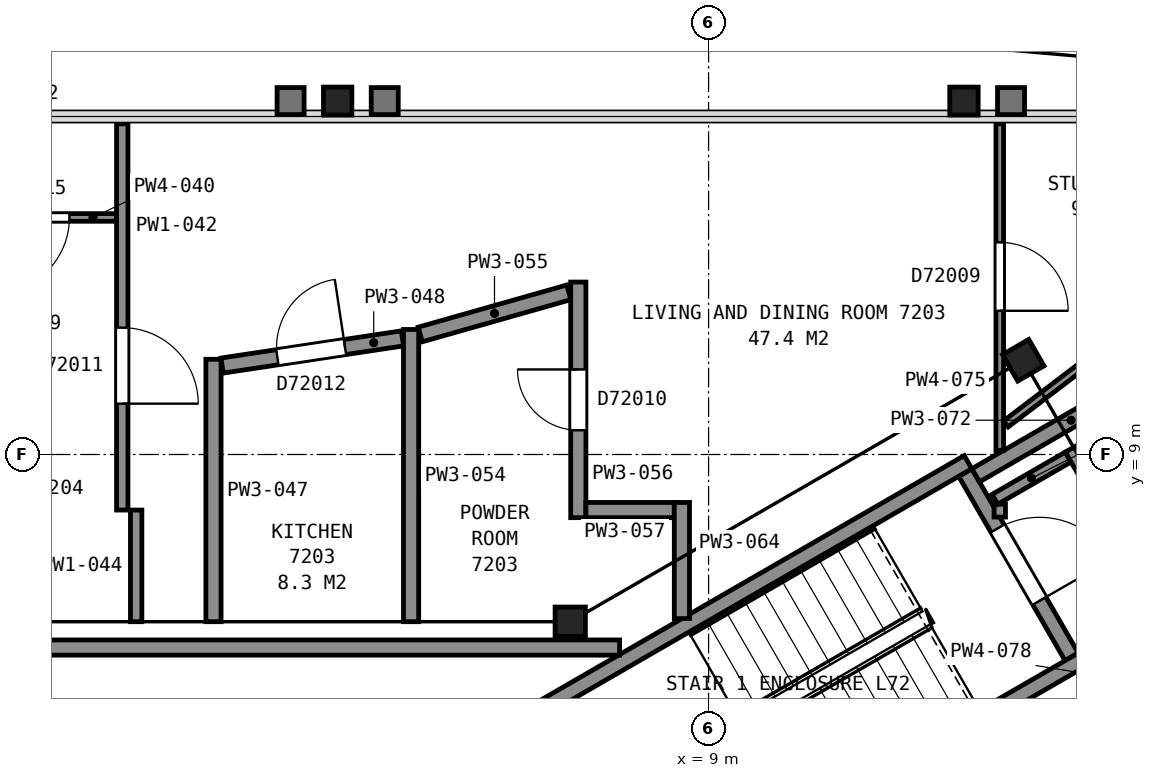
"""IFC4 building model, lengths in metres.
Left out: names, types, materials, properties, quantities, classifications, styles, units other than length and angle.
Written with IfcOpenShell. Run it as: python <this file> out.ifc"""

import sys

from ifc_helpers import new_model, si_unit, direction, frame, frame_2d, origin, origin_2d, place, context, subcontext, project, spatial, rectangle, i_section, extrude, element, fill, save


model = new_model("IFC4")
c1 = context("Model", 3, precision=1e-05, world=origin(), true_north=direction((0.0, 1.0)))
c2 = subcontext(c1, "Body", "Model", "MODEL_VIEW")
j1 = project(units=[si_unit("LENGTHUNIT", "METRE"), si_unit("PLANEANGLEUNIT", "RADIAN")], contexts=[c1])
p1 = place(None, origin())
s1 = spatial("IfcSite", under=j1, at=p1, CompositionType="ELEMENT")
p2 = place(p1, origin())
s2 = spatial("IfcBuilding", under=s1, at=p2, CompositionType="ELEMENT")
p3 = place(p2, frame((0.0, 0.0, 286.2)))
s3 = spatial("IfcBuildingStorey", under=s2, at=p3, CompositionType="ELEMENT", Elevation=286.2)
for number, where, z_axis, x_axis in (
    (1, (12.36, 13.65, 0.0), (0.0, 0.0, 1.0), (1.0, 0.0, 0.0)),
    (2, (4.12, 13.65, 0.0), (0.0, 0.0, 1.0), (1.0, 0.0, 0.0)),
):
    element("IfcColumn", number, at=place(p3, frame(where, z_axis=z_axis, x_axis=x_axis)), inside=s3, PredefinedType="COLUMN", context=c2, shape_type="SweptSolid", body=[
        extrude(i_section(OverallWidth=0.373, OverallDepth=0.368, WebThickness=0.015, FlangeThickness=0.024, FilletRadius=0.015, at=origin_2d()), origin(), (0.0, 0.0, 1.0), 3.7),
    ])
p4 = place(p3, frame((13.14, 10.24, 0.0), z_axis=(0.0, 0.0, 1.0), x_axis=(0.5, -0.866025403784, 0.0)))
e3 = element("IfcColumn", 3, at=p4, inside=s3, PredefinedType="COLUMN", context=c2, shape_type="SweptSolid", body=[
    extrude(i_section(OverallWidth=0.401, OverallDepth=0.399, WebThickness=0.025, FlangeThickness=0.04, FilletRadius=0.015, at=origin_2d()), origin(), (0.0, 0.0, 1.0), 3.7),
])
p5 = place(p3, frame((7.18, 6.8, 0.0), z_axis=(0.0, 0.0, 1.0), x_axis=(1.0, 0.0, 0.0)))
e4 = element("IfcColumn", 4, at=p5, inside=s3, PredefinedType="COLUMN", context=c2, shape_type="SweptSolid", body=[
    extrude(i_section(OverallWidth=0.399, OverallDepth=0.386, WebThickness=0.021, FlangeThickness=0.033, FilletRadius=0.015, at=origin_2d()), origin(), (0.0, 0.0, 1.0), 3.7),
])
p6 = place(p3, frame((13.777, 6.338, 0.0), z_axis=(0.0, 0.0, 1.0), x_axis=(-0.500049511043, 0.865996816683, 0.0)))
e5 = element("IfcWall", 5, at=p6, inside=s3, PredefinedType="PARTITIONING", context=c2, shape_type="SweptSolid", body=[
    extrude(rectangle(XDim=2.8, YDim=0.2, at=frame_2d((1.4, 0.0))), origin(), (0.0, 0.0, 1.0), 3.45),
])
p7 = place(p6, frame((0.85, 0.0, 0.0)))
e6 = element("IfcOpeningElement", 6, at=p7, cuts=e5, PredefinedType="OPENING", context=c2, shape_type="SweptSolid", body=[
    extrude(rectangle(XDim=1.1, YDim=2.1, at=frame_2d((0.55, 1.05))), frame((0.0, 0.11, 0.0), z_axis=(0.0, -1.0, 0.0), x_axis=(1.0, 0.0, 0.0)), (0.0, 0.0, 1.0), 0.22),
])
for number, where, z_axis, x_axis in (
    (7, (6.178, 5.299, 0.0), (0.0, 0.0, 1.0), (0.866, 0.5, 0.0)),
    (8, (7.678, 2.701, 0.0), (0.0, 0.0, 1.0), (0.866, 0.5, 0.0)),
):
    element("IfcWall", number, at=place(p3, frame(where, z_axis=z_axis, x_axis=x_axis)), inside=s3, PredefinedType="PARTITIONING", context=c2, shape_type="SweptSolid", body=[
        extrude(rectangle(XDim=7.2, YDim=0.2, at=frame_2d((3.6, 0.0))), origin(), (0.0, 0.0, 1.0), 3.45),
    ])
p8 = place(p3, frame((7.829, 6.46, 0.0), z_axis=(0.0, 0.0, 1.0), x_axis=(-1.0, 0.0, 0.0)))
e9 = element("IfcWall", 9, at=p8, inside=s3, PredefinedType="PARTITIONING", context=c2, shape_type="SweptSolid", body=[
    extrude(rectangle(XDim=15.658, YDim=0.2, at=frame_2d((7.829, 0.0))), origin(), (0.0, 0.0, 1.0), 3.45),
])
p9 = place(p8, frame((12.168, 0.0, 0.0)))
e10 = element("IfcOpeningElement", 10, at=p9, cuts=e9, PredefinedType="OPENING", context=c2, shape_type="SweptSolid", body=[
    extrude(rectangle(XDim=1.2, YDim=2.1, at=frame_2d((0.6, 1.05))), frame((0.0, 0.11, 0.0), z_axis=(0.0, -1.0, 0.0), x_axis=(1.0, 0.0, 0.0)), (0.0, 0.0, 1.0), 0.22),
])
p10 = place(p3, frame((-1.014, 12.119, 0.0), z_axis=(0.0, 0.0, 1.0), x_axis=(1.0, 0.0, 0.0)))
e11 = element("IfcWall", 11, at=p10, inside=s3, PredefinedType="PARTITIONING", context=c2, shape_type="SweptSolid", body=[
    extrude(rectangle(XDim=2.225, YDim=0.1, at=frame_2d((1.112, 0.0))), origin(), (0.0, 0.0, 1.0), 2.723),
])
p11 = place(p10, frame((0.605, 0.0, 0.0)))
e12 = element("IfcOpeningElement", 12, at=p11, cuts=e11, PredefinedType="OPENING", context=c2, shape_type="SweptSolid", body=[
    extrude(rectangle(XDim=1.0, YDim=2.1, at=frame_2d((0.5, 1.05))), frame((0.0, 0.06, 0.0), z_axis=(0.0, -1.0, 0.0), x_axis=(1.0, 0.0, 0.0)), (0.0, 0.0, 1.0), 0.12),
])
p12 = place(p3, frame((1.286, 13.351, 0.0), z_axis=(0.0, 0.0, 1.0), x_axis=(0.0, -1.0, 0.0)))
e13 = element("IfcWall", 13, at=p12, inside=s3, PredefinedType="PARTITIONING", context=c2, shape_type="SweptSolid", body=[
    extrude(rectangle(XDim=5.082, YDim=0.15, at=frame_2d((2.541, 0.0))), origin(), (0.0, 0.0, 1.0), 2.723),
])
p13 = place(p12, frame((2.682, 0.0, 0.0)))
e14 = element("IfcOpeningElement", 14, at=p13, cuts=e13, PredefinedType="OPENING", context=c2, shape_type="SweptSolid", body=[
    extrude(rectangle(XDim=1.0, YDim=2.1, at=frame_2d((0.5, 1.05))), frame((0.0, 0.085, 0.0), z_axis=(0.0, -1.0, 0.0), x_axis=(1.0, 0.0, 0.0)), (0.0, 0.0, 1.0), 0.17),
])
p14 = place(p3, frame((1.469, 6.8, 0.0), z_axis=(0.0, 0.0, 1.0), x_axis=(0.0, 1.0, 0.0)))
e15 = element("IfcWall", 15, at=p14, inside=s3, PredefinedType="PARTITIONING", context=c2, shape_type="SweptSolid", body=[
    extrude(rectangle(XDim=1.469, YDim=0.15, at=frame_2d((0.734, 0.0))), origin(), (0.0, 0.0, 1.0), 2.723),
])
p15 = place(p3, frame((2.486, 6.8, 0.0), z_axis=(0.0, 0.0, 1.0), x_axis=(0.0, 1.0, 0.0)))
e16 = element("IfcWall", 16, at=p15, inside=s3, PredefinedType="PARTITIONING", context=c2, shape_type="SweptSolid", body=[
    extrude(rectangle(XDim=3.453, YDim=0.2, at=frame_2d((1.727, 0.0))), origin(), (0.0, 0.0, 1.0), 2.723),
])
p16 = place(p3, frame((4.972, 10.528, 0.0), z_axis=(0.0, 0.0, 1.0), x_axis=(-0.988827119235, -0.149066858374, 0.0)))
e17 = element("IfcWall", 17, at=p16, inside=s3, PredefinedType="PARTITIONING", context=c2, shape_type="SweptSolid", body=[
    extrude(rectangle(XDim=2.399, YDim=0.2, at=frame_2d((1.2, 0.0))), origin(), (0.0, 0.0, 1.0), 2.723),
])
p17 = place(p16, frame((0.764, 0.0, 0.0)))
e18 = element("IfcOpeningElement", 18, at=p17, cuts=e17, PredefinedType="OPENING", context=c2, shape_type="SweptSolid", body=[
    extrude(rectangle(XDim=0.9, YDim=2.1, at=frame_2d((0.45, 1.05))), frame((0.0, 0.11, 0.0), z_axis=(0.0, -1.0, 0.0), x_axis=(1.0, 0.0, 0.0)), (0.0, 0.0, 1.0), 0.22),
])
p18 = place(p3, frame((5.086, 6.8, 0.0), z_axis=(0.0, 0.0, 1.0), x_axis=(0.0, 1.0, 0.0)))
e19 = element("IfcWall", 19, at=p18, inside=s3, PredefinedType="PARTITIONING", context=c2, shape_type="SweptSolid", body=[
    extrude(rectangle(XDim=3.845, YDim=0.2, at=frame_2d((1.922, 0.0))), origin(), (0.0, 0.0, 1.0), 2.723),
])
p19 = place(p3, frame((5.206, 10.579, 0.0), z_axis=(0.0, 0.0, 1.0), x_axis=(0.962043687615, 0.272895480212, 0.0)))
e20 = element("IfcWall", 20, at=p19, inside=s3, PredefinedType="PARTITIONING", context=c2, shape_type="SweptSolid", body=[
    extrude(rectangle(XDim=2.032, YDim=0.2, at=frame_2d((1.016, 0.0))), origin(), (0.0, 0.0, 1.0), 2.723),
])
p20 = place(p3, frame((7.286, 8.169, 0.0), z_axis=(0.0, 0.0, 1.0), x_axis=(0.0, 1.0, 0.0)))
e21 = element("IfcWall", 21, at=p20, inside=s3, PredefinedType="PARTITIONING", context=c2, shape_type="SweptSolid", body=[
    extrude(rectangle(XDim=3.1, YDim=0.2, at=frame_2d((1.55, 0.0))), origin(), (0.0, 0.0, 1.0), 2.723),
])
p21 = place(p20, frame((1.15, 0.0, 0.0)))
e22 = element("IfcOpeningElement", 22, at=p21, cuts=e21, PredefinedType="OPENING", context=c2, shape_type="SweptSolid", body=[
    extrude(rectangle(XDim=0.8, YDim=2.1, at=frame_2d((0.4, 1.05))), frame((0.0, 0.11, 0.0), z_axis=(0.0, -1.0, 0.0), x_axis=(1.0, 0.0, 0.0)), (0.0, 0.0, 1.0), 0.22),
])
p22 = place(p3, frame((7.386, 8.269, 0.0), z_axis=(0.0, 0.0, 1.0), x_axis=(1.0, 0.0, 0.0)))
e23 = element("IfcWall", 23, at=p22, inside=s3, PredefinedType="PARTITIONING", context=c2, shape_type="SweptSolid", body=[
    extrude(rectangle(XDim=1.163, YDim=0.2, at=frame_2d((0.582, 0.0))), origin(), (0.0, 0.0, 1.0), 2.723),
])
p23 = place(p3, frame((8.649, 6.841, 0.0), z_axis=(0.0, 0.0, 1.0), x_axis=(0.0, 1.0, 0.0)))
e24 = element("IfcWall", 24, at=p23, inside=s3, PredefinedType="PARTITIONING", context=c2, shape_type="SweptSolid", body=[
    extrude(rectangle(XDim=1.528, YDim=0.2, at=frame_2d((0.764, 0.0))), origin(), (0.0, 0.0, 1.0), 2.723),
])
p24 = place(p3, frame((12.514, 8.726, 0.0), z_axis=(0.0, 0.0, 1.0), x_axis=(0.865969617579, 0.500096612097, 0.0)))
e25 = element("IfcWall", 25, at=p24, inside=s3, PredefinedType="PARTITIONING", context=c2, shape_type="SweptSolid", body=[
    extrude(rectangle(XDim=2.899, YDim=0.2, at=frame_2d((1.45, 0.0))), origin(), (0.0, 0.0, 1.0), 2.723),
])
p25 = place(p3, frame((12.831, 8.177, 0.0), z_axis=(0.0, 0.0, 1.0), x_axis=(0.0, 1.0, 0.0)))
e26 = element("IfcWall", 26, at=p25, inside=s3, PredefinedType="PARTITIONING", context=c2, shape_type="SweptSolid", body=[
    extrude(rectangle(XDim=0.17, YDim=0.15, at=frame_2d((0.085, 0.0))), origin(), (0.0, 0.0, 1.0), 2.723),
])
p26 = place(p3, frame((12.766, 8.409, 0.0), z_axis=(0.0, 0.0, 1.0), x_axis=(0.865995823051, 0.500051231833, 0.0)))
e27 = element("IfcWall", 27, at=p26, inside=s3, PredefinedType="PARTITIONING", context=c2, shape_type="SweptSolid", body=[
    extrude(rectangle(XDim=1.114, YDim=0.15, at=frame_2d((0.557, 0.0))), origin(), (0.0, 0.0, 1.0), 2.723),
])
p27 = place(p3, frame((12.831, 13.351, 0.0), z_axis=(0.0, 0.0, 1.0), x_axis=(0.0, -1.0, 0.0)))
e28 = element("IfcWall", 28, at=p27, inside=s3, PredefinedType="PARTITIONING", context=c2, shape_type="SweptSolid", body=[
    extrude(rectangle(XDim=4.298, YDim=0.1, at=frame_2d((2.149, 0.0))), origin(), (0.0, 0.0, 1.0), 2.723),
])
p28 = place(p27, frame((1.56, 0.0, 0.0)))
e29 = element("IfcOpeningElement", 29, at=p28, cuts=e28, PredefinedType="OPENING", context=c2, shape_type="SweptSolid", body=[
    extrude(rectangle(XDim=0.9, YDim=2.1, at=frame_2d((0.45, 1.05))), frame((0.0, 0.06, 0.0), z_axis=(0.0, -1.0, 0.0), x_axis=(1.0, 0.0, 0.0)), (0.0, 0.0, 1.0), 0.12),
])
p29 = place(p3, frame((18.144, 13.383, 0.0), z_axis=(0.0, 0.0, 1.0), x_axis=(-0.795867985115, -0.605470189414, 0.0)))
e30 = element("IfcWall", 30, at=p29, inside=s3, PredefinedType="PARTITIONING", context=c2, shape_type="SweptSolid", body=[
    extrude(rectangle(XDim=6.574, YDim=0.1, at=frame_2d((3.287, 0.0))), origin(), (0.0, 0.0, 1.0), 2.723),
])
p30 = place(p29, frame((2.925, 0.0, 0.0)))
e31 = element("IfcOpeningElement", 31, at=p30, cuts=e30, PredefinedType="OPENING", context=c2, shape_type="SweptSolid", body=[
    extrude(rectangle(XDim=1.0, YDim=2.1, at=frame_2d((0.5, 1.05))), frame((0.0, 0.06, 0.0), z_axis=(0.0, -1.0, 0.0), x_axis=(1.0, 0.0, 0.0)), (0.0, 0.0, 1.0), 0.12),
])
p31 = place(p3, frame((13.759, 9.069, 0.0), z_axis=(0.0, 0.0, 1.0), x_axis=(0.500020344131, -0.866013657776, 0.0)))
e32 = element("IfcWall", 32, at=p31, inside=s3, PredefinedType="PARTITIONING", context=c2, shape_type="SweptSolid", body=[
    extrude(rectangle(XDim=2.625, YDim=0.15, at=frame_2d((1.312, 0.0))), origin(), (0.0, 0.0, 1.0), 2.723),
])
p32 = place(p7, origin())
e33 = element("IfcDoor", 33, at=p32, inside=s3, OperationType="SINGLE_SWING_LEFT", PredefinedType="DOOR", context=c2, shape_type="SweptSolid", body=[
    extrude(rectangle(XDim=1.1, YDim=2.1, at=frame_2d((0.55, 1.05))), frame((0.0, 0.025, 0.0), z_axis=(0.0, -1.0, 0.0), x_axis=(1.0, 0.0, 0.0)), (0.0, 0.0, 1.0), 0.05),
])
fill(e6, e33)
p33 = place(p11, origin())
e34 = element("IfcDoor", 34, at=p33, inside=s3, OperationType="SINGLE_SWING_LEFT", PredefinedType="DOOR", context=c2, shape_type="SweptSolid", body=[
    extrude(rectangle(XDim=1.0, YDim=2.1, at=frame_2d((0.5, 1.05))), frame((0.0, 0.025, 0.0), z_axis=(0.0, -1.0, 0.0), x_axis=(1.0, 0.0, 0.0)), (0.0, 0.0, 1.0), 0.05),
])
fill(e12, e34)
p34 = place(p13, origin())
e35 = element("IfcDoor", 35, at=p34, inside=s3, OperationType="SINGLE_SWING_RIGHT", PredefinedType="DOOR", context=c2, shape_type="SweptSolid", body=[
    extrude(rectangle(XDim=1.0, YDim=2.1, at=frame_2d((0.5, 1.05))), frame((0.0, 0.025, 0.0), z_axis=(0.0, -1.0, 0.0), x_axis=(1.0, 0.0, 0.0)), (0.0, 0.0, 1.0), 0.05),
])
fill(e14, e35)
p35 = place(p17, origin())
e36 = element("IfcDoor", 36, at=p35, inside=s3, OperationType="SINGLE_SWING_LEFT", PredefinedType="DOOR", context=c2, shape_type="SweptSolid", body=[
    extrude(rectangle(XDim=0.9, YDim=2.1, at=frame_2d((0.45, 1.05))), frame((0.0, 0.025, 0.0), z_axis=(0.0, -1.0, 0.0), x_axis=(1.0, 0.0, 0.0)), (0.0, 0.0, 1.0), 0.05),
])
fill(e18, e36)
p36 = place(p21, origin())
e37 = element("IfcDoor", 37, at=p36, inside=s3, OperationType="SINGLE_SWING_RIGHT", PredefinedType="DOOR", context=c2, shape_type="SweptSolid", body=[
    extrude(rectangle(XDim=0.8, YDim=2.1, at=frame_2d((0.4, 1.05))), frame((0.0, 0.025, 0.0), z_axis=(0.0, -1.0, 0.0), x_axis=(1.0, 0.0, 0.0)), (0.0, 0.0, 1.0), 0.05),
])
fill(e22, e37)
p37 = place(p28, origin())
e38 = element("IfcDoor", 38, at=p37, inside=s3, OperationType="SINGLE_SWING_RIGHT", PredefinedType="DOOR", context=c2, shape_type="SweptSolid", body=[
    extrude(rectangle(XDim=0.9, YDim=2.1, at=frame_2d((0.45, 1.05))), frame((0.0, 0.025, 0.0), z_axis=(0.0, -1.0, 0.0), x_axis=(1.0, 0.0, 0.0)), (0.0, 0.0, 1.0), 0.05),
])
fill(e29, e38)
save(model, sys.argv[1])
